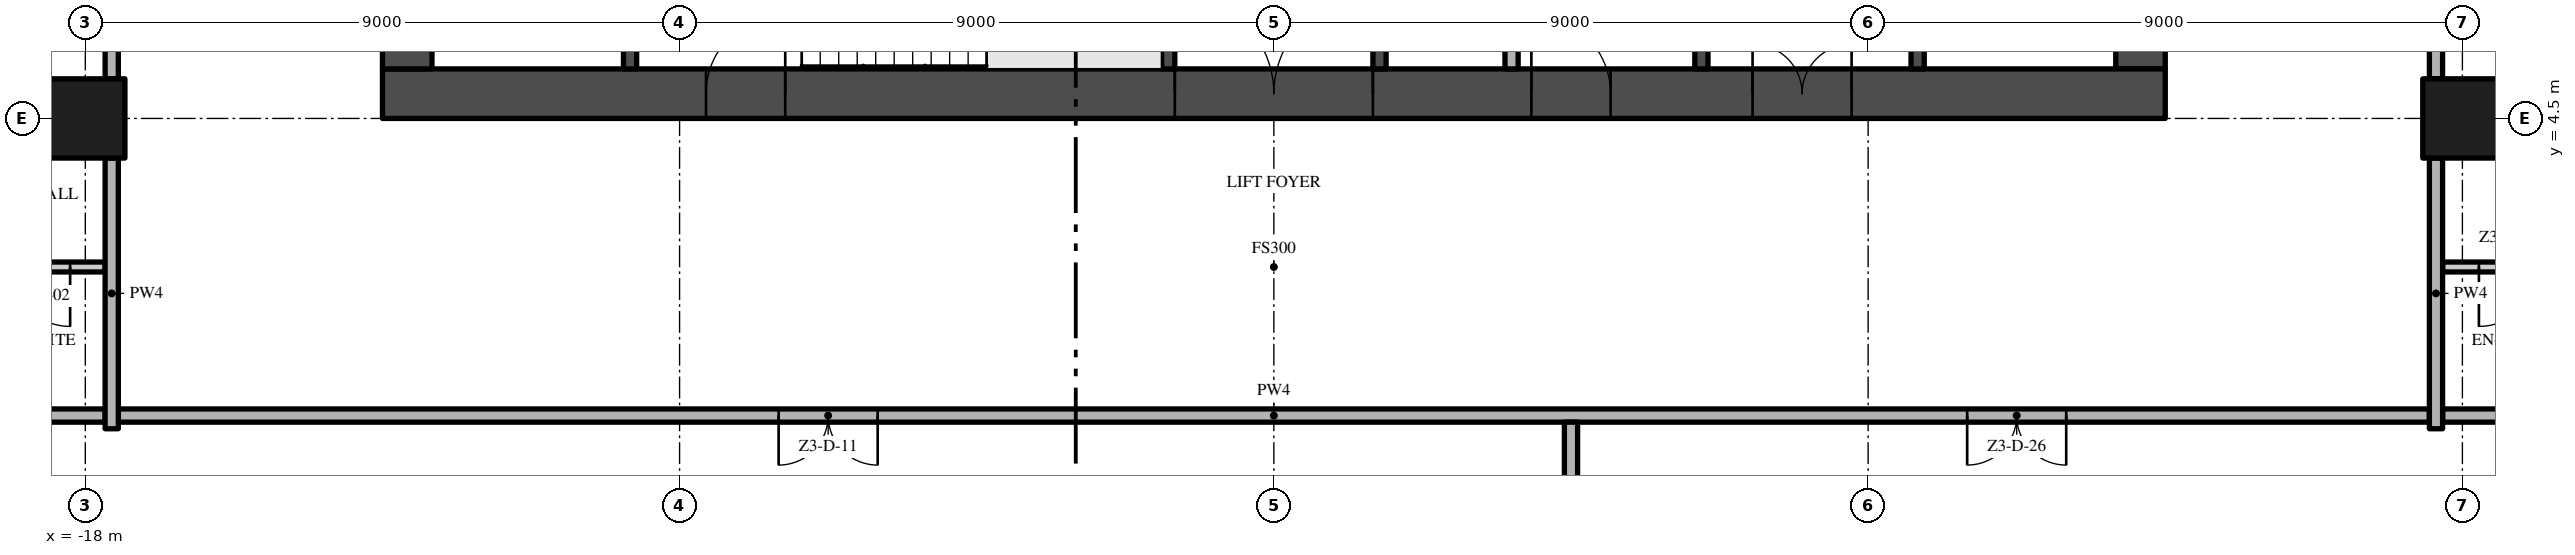
"""IFC4 building model, lengths in metres.
Left out: names, types, materials, properties, quantities, classifications, styles, units other than length and angle.
Written with IfcOpenShell. Run it as: python <this file> out.ifc"""

import sys

from ifc_helpers import new_model, si_unit, direction, frame, frame_2d, origin, origin_2d, place, context, subcontext, project, spatial, rectangle, extrude, element, fill, save


model = new_model("IFC4")
c1 = context("Model", 3, precision=1e-05, world=origin(), true_north=direction((0.0, 1.0)))
c2 = subcontext(c1, "Body", "Model", "MODEL_VIEW")
j1 = project(units=[si_unit("LENGTHUNIT", "METRE"), si_unit("PLANEANGLEUNIT", "RADIAN")], contexts=[c1])
p1 = place(None, origin())
s1 = spatial("IfcSite", under=j1, at=p1, CompositionType="ELEMENT")
p2 = place(p1, origin())
s2 = spatial("IfcBuilding", under=s1, at=p2, CompositionType="ELEMENT")
p3 = place(p2, frame((0.0, 0.0, 163.0)))
s3 = spatial("IfcBuildingStorey", under=s2, at=p3, CompositionType="ELEMENT", Elevation=163.0)
p4 = place(p3, frame((-13.5, 4.875, -0.3), z_axis=(0.0, 0.0, 1.0), x_axis=(1.0, 0.0, 0.0)))
e1 = element("IfcWall", 1, at=p4, inside=s3, PredefinedType="SHEAR", context=c2, shape_type="SweptSolid", body=[
    extrude(rectangle(XDim=27.0, YDim=0.75, at=frame_2d((13.5, 0.0))), origin(), (0.0, 0.0, 1.0), 3.8),
])
p5 = place(p4, frame((12.0, 0.0, 0.3)))
e2 = element("IfcOpeningElement", 2, at=p5, cuts=e1, PredefinedType="OPENING", context=c2, shape_type="SweptSolid", body=[
    extrude(rectangle(XDim=3.0, YDim=2.4, at=frame_2d((1.5, 1.2))), frame((0.0, 0.385, 0.0), z_axis=(0.0, -1.0, 0.0), x_axis=(1.0, 0.0, 0.0)), (0.0, 0.0, 1.0), 0.77),
])
p6 = place(p4, frame((4.9, 0.0, 0.3)))
e3 = element("IfcOpeningElement", 3, at=p6, cuts=e1, PredefinedType="OPENING", context=c2, shape_type="SweptSolid", body=[
    extrude(rectangle(XDim=1.2, YDim=2.2, at=frame_2d((0.6, 1.1))), frame((0.0, 0.385, 0.0), z_axis=(0.0, -1.0, 0.0), x_axis=(1.0, 0.0, 0.0)), (0.0, 0.0, 1.0), 0.77),
])
p7 = place(p4, frame((20.75, 0.0, 0.3)))
e4 = element("IfcOpeningElement", 4, at=p7, cuts=e1, PredefinedType="OPENING", context=c2, shape_type="SweptSolid", body=[
    extrude(rectangle(XDim=1.5, YDim=2.2, at=frame_2d((0.75, 1.1))), frame((0.0, 0.385, 0.0), z_axis=(0.0, -1.0, 0.0), x_axis=(1.0, 0.0, 0.0)), (0.0, 0.0, 1.0), 0.77),
])
p8 = place(p4, frame((17.4, 0.0, 0.3)))
e5 = element("IfcOpeningElement", 5, at=p8, cuts=e1, PredefinedType="OPENING", context=c2, shape_type="SweptSolid", body=[
    extrude(rectangle(XDim=1.2, YDim=2.2, at=frame_2d((0.6, 1.1))), frame((0.0, 0.385, 0.0), z_axis=(0.0, -1.0, 0.0), x_axis=(1.0, 0.0, 0.0)), (0.0, 0.0, 1.0), 0.77),
])
p9 = place(p3, frame((13.125, 5.25, -0.3), z_axis=(0.0, 0.0, 1.0), x_axis=(0.0, 1.0, 0.0)))
e6 = element("IfcWall", 6, at=p9, inside=s3, PredefinedType="SHEAR", context=c2, shape_type="SweptSolid", body=[
    extrude(rectangle(XDim=16.5, YDim=0.75, at=frame_2d((8.25, 0.0))), origin(), (0.0, 0.0, 1.0), 3.8),
])
p10 = place(p9, frame((6.15, 0.0, 0.3)))
e7 = element("IfcOpeningElement", 7, at=p10, cuts=e6, PredefinedType="OPENING", context=c2, shape_type="SweptSolid", body=[
    extrude(rectangle(XDim=1.2, YDim=2.2, at=frame_2d((0.6, 1.1))), frame((0.0, 0.385, 0.0), z_axis=(0.0, -1.0, 0.0), x_axis=(1.0, 0.0, 0.0)), (0.0, 0.0, 1.0), 0.77),
])
p11 = place(p3, frame((-13.125, 21.75, -0.3), z_axis=(0.0, 0.0, 1.0), x_axis=(0.0, -1.0, 0.0)))
e8 = element("IfcWall", 8, at=p11, inside=s3, PredefinedType="SHEAR", context=c2, shape_type="SweptSolid", body=[
    extrude(rectangle(XDim=16.5, YDim=0.75, at=frame_2d((8.25, 0.0))), origin(), (0.0, 0.0, 1.0), 3.8),
])
p12 = place(p11, frame((9.15, 0.0, 0.3)))
e9 = element("IfcOpeningElement", 9, at=p12, cuts=e8, PredefinedType="OPENING", context=c2, shape_type="SweptSolid", body=[
    extrude(rectangle(XDim=1.2, YDim=2.2, at=frame_2d((0.6, 1.1))), frame((0.0, 0.385, 0.0), z_axis=(0.0, -1.0, 0.0), x_axis=(1.0, 0.0, 0.0)), (0.0, 0.0, 1.0), 0.77),
])
for number, where, z_axis, x_axis in (
    (10, (-18.0, 4.5, 0.0), (0.0, 0.0, 1.0), (1.0, 0.0, 0.0)),
    (11, (18.0, 4.5, 0.0), (0.0, 0.0, 1.0), (1.0, 0.0, 0.0)),
):
    element("IfcColumn", number, at=place(p3, frame(where, z_axis=z_axis, x_axis=x_axis)), inside=s3, PredefinedType="COLUMN", context=c2, shape_type="SweptSolid", body=[
        extrude(rectangle(XDim=1.2, YDim=1.2, at=origin_2d()), origin(), (0.0, 0.0, 1.0), 3.5),
    ])
for number, where, z_axis, x_axis in (
    (12, (-9.75, 5.25, 0.0), (0.0, 0.0, 1.0), (0.0, 1.0, 0.0)),
    (13, (-1.6, 5.25, 0.0), (0.0, 0.0, 1.0), (0.0, 1.0, 0.0)),
):
    element("IfcWall", number, at=place(p3, frame(where, z_axis=z_axis, x_axis=x_axis)), inside=s3, PredefinedType="SHEAR", context=c2, shape_type="SweptSolid", body=[
        extrude(rectangle(XDim=2.7, YDim=0.2, at=frame_2d((1.35, 0.0))), origin(), (0.0, 0.0, 1.0), 3.5),
    ])
p13 = place(p3, frame((1.6, 13.5, 0.0), z_axis=(0.0, 0.0, 1.0), x_axis=(0.0, -1.0, 0.0)))
e14 = element("IfcWall", 14, at=p13, inside=s3, PredefinedType="SHEAR", context=c2, shape_type="SweptSolid", body=[
    extrude(rectangle(XDim=8.25, YDim=0.2, at=frame_2d((4.125, 0.0))), origin(), (0.0, 0.0, 1.0), 3.5),
])
p14 = place(p13, frame((3.275, 0.0, 0.0)))
e15 = element("IfcOpeningElement", 15, at=p14, cuts=e14, PredefinedType="OPENING", context=c2, shape_type="SweptSolid", body=[
    extrude(rectangle(XDim=0.9, YDim=2.1, at=frame_2d((0.45, 1.05))), frame((0.0, 0.11, 0.0), z_axis=(0.0, -1.0, 0.0), x_axis=(1.0, 0.0, 0.0)), (0.0, 0.0, 1.0), 0.22),
])
p15 = place(p3, frame((3.6, 13.5, 0.0), z_axis=(0.0, 0.0, 1.0), x_axis=(0.0, -1.0, 0.0)))
e16 = element("IfcWall", 16, at=p15, inside=s3, PredefinedType="PARTITIONING", context=c2, shape_type="SweptSolid", body=[
    extrude(rectangle(XDim=8.25, YDim=0.2, at=frame_2d((4.125, 0.0))), origin(), (0.0, 0.0, 1.0), 3.5),
])
p16 = place(p15, frame((3.675, 0.0, 0.0)))
e17 = element("IfcOpeningElement", 17, at=p16, cuts=e16, PredefinedType="OPENING", context=c2, shape_type="SweptSolid", body=[
    extrude(rectangle(XDim=0.9, YDim=2.1, at=frame_2d((0.45, 1.05))), frame((0.0, 0.11, 0.0), z_axis=(0.0, -1.0, 0.0), x_axis=(1.0, 0.0, 0.0)), (0.0, 0.0, 1.0), 0.22),
])
p17 = place(p3, frame((6.475, 5.25, 0.0), z_axis=(0.0, 0.0, 1.0), x_axis=(0.0, 1.0, 0.0)))
e18 = element("IfcWall", 18, at=p17, inside=s3, PredefinedType="SHEAR", context=c2, shape_type="SweptSolid", body=[
    extrude(rectangle(XDim=6.85, YDim=0.2, at=frame_2d((3.425, 0.0))), origin(), (0.0, 0.0, 1.0), 3.5),
])
p18 = place(p3, frame((9.75, 5.25, 0.0), z_axis=(0.0, 0.0, 1.0), x_axis=(0.0, 1.0, 0.0)))
e19 = element("IfcWall", 19, at=p18, inside=s3, PredefinedType="SHEAR", context=c2, shape_type="SweptSolid", body=[
    extrude(rectangle(XDim=2.35, YDim=0.2, at=frame_2d((1.175, 0.0))), origin(), (0.0, 0.0, 1.0), 3.5),
])
p19 = place(p18, frame((0.7, 0.0, 0.0)))
e20 = element("IfcOpeningElement", 20, at=p19, cuts=e19, PredefinedType="OPENING", context=c2, shape_type="SweptSolid", body=[
    extrude(rectangle(XDim=1.1, YDim=2.1, at=frame_2d((0.55, 1.05))), frame((0.0, 0.11, 0.0), z_axis=(0.0, -1.0, 0.0), x_axis=(1.0, 0.0, 0.0)), (0.0, 0.0, 1.0), 0.22),
])
p20 = place(p3, frame((17.5, 0.0, 0.0), z_axis=(0.0, 0.0, 1.0), x_axis=(-1.0, 0.0, 0.0)))
e21 = element("IfcWall", 21, at=p20, inside=s3, PredefinedType="PARTITIONING", context=c2, shape_type="SweptSolid", body=[
    extrude(rectangle(XDim=35.0, YDim=0.2, at=frame_2d((17.5, 0.0))), origin(), (0.0, 0.0, 1.0), 3.5),
])
p21 = place(p20, frame((23.5, 0.0, 0.0)))
e22 = element("IfcOpeningElement", 22, at=p21, cuts=e21, PredefinedType="OPENING", context=c2, shape_type="SweptSolid", body=[
    extrude(rectangle(XDim=1.5, YDim=2.4, at=frame_2d((0.75, 1.2))), frame((0.0, 0.11, 0.0), z_axis=(0.0, -1.0, 0.0), x_axis=(1.0, 0.0, 0.0)), (0.0, 0.0, 1.0), 0.22),
])
p22 = place(p20, frame((5.5, 0.0, 0.0)))
e23 = element("IfcOpeningElement", 23, at=p22, cuts=e21, PredefinedType="OPENING", context=c2, shape_type="SweptSolid", body=[
    extrude(rectangle(XDim=1.5, YDim=2.4, at=frame_2d((0.75, 1.2))), frame((0.0, 0.11, 0.0), z_axis=(0.0, -1.0, 0.0), x_axis=(1.0, 0.0, 0.0)), (0.0, 0.0, 1.0), 0.22),
])
for number, where, z_axis, x_axis in (
    (24, (-22.2, 0.0, 0.0), (0.0, 0.0, 1.0), (1.0, 0.0, 0.0)),
    (25, (17.7, 0.0, 0.0), (0.0, 0.0, 1.0), (1.0, 0.0, 0.0)),
):
    element("IfcWall", number, at=place(p3, frame(where, z_axis=z_axis, x_axis=x_axis)), inside=s3, PredefinedType="PARTITIONING", context=c2, shape_type="SweptSolid", body=[
        extrude(rectangle(XDim=4.5, YDim=0.2, at=frame_2d((2.25, 0.0))), origin(), (0.0, 0.0, 1.0), 3.5),
    ])
p23 = place(p3, frame((-17.7, 2.25, 0.0), z_axis=(0.0, 0.0, 1.0), x_axis=(-1.0, 0.0, 0.0)))
e26 = element("IfcWall", 26, at=p23, inside=s3, PredefinedType="PARTITIONING", context=c2, shape_type="SweptSolid", body=[
    extrude(rectangle(XDim=2.03, YDim=0.15, at=frame_2d((1.015, 0.0))), origin(), (0.0, 0.0, 1.0), 3.5),
])
p24 = place(p23, frame((0.53, 0.0, 0.0)))
e27 = element("IfcOpeningElement", 27, at=p24, cuts=e26, PredefinedType="OPENING", context=c2, shape_type="SweptSolid", body=[
    extrude(rectangle(XDim=0.9, YDim=2.1, at=frame_2d((0.45, 1.05))), frame((0.0, 0.085, 0.0), z_axis=(0.0, -1.0, 0.0), x_axis=(1.0, 0.0, 0.0)), (0.0, 0.0, 1.0), 0.17),
])
p25 = place(p3, frame((19.73, 2.25, 0.0), z_axis=(0.0, 0.0, 1.0), x_axis=(-1.0, 0.0, 0.0)))
e28 = element("IfcWall", 28, at=p25, inside=s3, PredefinedType="PARTITIONING", context=c2, shape_type="SweptSolid", body=[
    extrude(rectangle(XDim=2.03, YDim=0.15, at=frame_2d((1.015, 0.0))), origin(), (0.0, 0.0, 1.0), 3.5),
])
p26 = place(p25, frame((0.58, 0.0, 0.0)))
e29 = element("IfcOpeningElement", 29, at=p26, cuts=e28, PredefinedType="OPENING", context=c2, shape_type="SweptSolid", body=[
    extrude(rectangle(XDim=0.9, YDim=2.1, at=frame_2d((0.45, 1.05))), frame((0.0, 0.085, 0.0), z_axis=(0.0, -1.0, 0.0), x_axis=(1.0, 0.0, 0.0)), (0.0, 0.0, 1.0), 0.17),
])
p27 = place(p3, frame((-17.6, -0.2, 0.0), z_axis=(0.0, 0.0, 1.0), x_axis=(0.0, 1.0, 0.0)))
e30 = element("IfcWall", 30, at=p27, inside=s3, PredefinedType="PARTITIONING", context=c2, shape_type="SweptSolid", body=[
    extrude(rectangle(XDim=4.1, YDim=0.2, at=frame_2d((2.05, 0.0))), origin(), (0.0, 0.0, 1.0), 3.5),
])
p28 = place(p3, frame((-17.6, 5.1, 0.0), z_axis=(0.0, 0.0, 1.0), x_axis=(0.0, 1.0, 0.0)))
e31 = element("IfcWall", 31, at=p28, inside=s3, PredefinedType="PARTITIONING", context=c2, shape_type="SweptSolid", body=[
    extrude(rectangle(XDim=7.8, YDim=0.2, at=frame_2d((3.9, 0.0))), origin(), (0.0, 0.0, 1.0), 3.5),
])
p29 = place(p28, frame((1.05, 0.0, 0.0)))
e32 = element("IfcOpeningElement", 32, at=p29, cuts=e31, PredefinedType="OPENING", context=c2, shape_type="SweptSolid", body=[
    extrude(rectangle(XDim=1.2, YDim=2.4, at=frame_2d((0.6, 1.2))), frame((0.0, 0.11, 0.0), z_axis=(0.0, -1.0, 0.0), x_axis=(1.0, 0.0, 0.0)), (0.0, 0.0, 1.0), 0.22),
])
p30 = place(p3, frame((4.5, -17.7, 0.0), z_axis=(0.0, 0.0, 1.0), x_axis=(0.0, 1.0, 0.0)))
e33 = element("IfcWall", 33, at=p30, inside=s3, PredefinedType="PARTITIONING", context=c2, shape_type="SweptSolid", body=[
    extrude(rectangle(XDim=17.6, YDim=0.2, at=frame_2d((8.8, 0.0))), origin(), (0.0, 0.0, 1.0), 3.5),
])
p31 = place(p3, frame((17.6, -0.2, 0.0), z_axis=(0.0, 0.0, 1.0), x_axis=(0.0, 1.0, 0.0)))
e34 = element("IfcWall", 34, at=p31, inside=s3, PredefinedType="PARTITIONING", context=c2, shape_type="SweptSolid", body=[
    extrude(rectangle(XDim=4.1, YDim=0.2, at=frame_2d((2.05, 0.0))), origin(), (0.0, 0.0, 1.0), 3.5),
])
p32 = place(p3, frame((17.6, 12.9, 0.0), z_axis=(0.0, 0.0, 1.0), x_axis=(0.0, -1.0, 0.0)))
e35 = element("IfcWall", 35, at=p32, inside=s3, PredefinedType="PARTITIONING", context=c2, shape_type="SweptSolid", body=[
    extrude(rectangle(XDim=7.8, YDim=0.2, at=frame_2d((3.9, 0.0))), origin(), (0.0, 0.0, 1.0), 3.5),
])
p33 = place(p32, frame((5.55, 0.0, 0.0)))
e36 = element("IfcOpeningElement", 36, at=p33, cuts=e35, PredefinedType="OPENING", context=c2, shape_type="SweptSolid", body=[
    extrude(rectangle(XDim=1.2, YDim=2.4, at=frame_2d((0.6, 1.2))), frame((0.0, 0.11, 0.0), z_axis=(0.0, -1.0, 0.0), x_axis=(1.0, 0.0, 0.0)), (0.0, 0.0, 1.0), 0.22),
])
p34 = place(p5, frame((3.0, 0.0, 0.0), z_axis=(0.0, 0.0, 1.0), x_axis=(-1.0, 0.0, 0.0)))
e37 = element("IfcDoor", 37, at=p34, inside=s3, OperationType="DOUBLE_DOOR_SINGLE_SWING", PredefinedType="DOOR", context=c2, shape_type="SweptSolid", body=[
    extrude(rectangle(XDim=3.0, YDim=2.4, at=frame_2d((1.5, 1.2))), frame((0.0, 0.025, 0.0), z_axis=(0.0, -1.0, 0.0), x_axis=(1.0, 0.0, 0.0)), (0.0, 0.0, 1.0), 0.05),
])
fill(e2, e37)
p35 = place(p6, frame((1.2, 0.0, 0.0), z_axis=(0.0, 0.0, 1.0), x_axis=(-1.0, 0.0, 0.0)))
e38 = element("IfcDoor", 38, at=p35, inside=s3, OperationType="SINGLE_SWING_LEFT", PredefinedType="DOOR", context=c2, shape_type="SweptSolid", body=[
    extrude(rectangle(XDim=1.2, YDim=2.2, at=frame_2d((0.6, 1.1))), frame((0.0, 0.025, 0.0), z_axis=(0.0, -1.0, 0.0), x_axis=(1.0, 0.0, 0.0)), (0.0, 0.0, 1.0), 0.05),
])
fill(e3, e38)
p36 = place(p7, frame((1.5, 0.0, 0.0), z_axis=(0.0, 0.0, 1.0), x_axis=(-1.0, 0.0, 0.0)))
e39 = element("IfcDoor", 39, at=p36, inside=s3, OperationType="DOUBLE_DOOR_SINGLE_SWING", PredefinedType="DOOR", context=c2, shape_type="SweptSolid", body=[
    extrude(rectangle(XDim=1.5, YDim=2.2, at=frame_2d((0.75, 1.1))), frame((0.0, 0.025, 0.0), z_axis=(0.0, -1.0, 0.0), x_axis=(1.0, 0.0, 0.0)), (0.0, 0.0, 1.0), 0.05),
])
fill(e4, e39)
p37 = place(p8, frame((1.2, 0.0, 0.0), z_axis=(0.0, 0.0, 1.0), x_axis=(-1.0, 0.0, 0.0)))
e40 = element("IfcDoor", 40, at=p37, inside=s3, OperationType="SINGLE_SWING_RIGHT", PredefinedType="DOOR", context=c2, shape_type="SweptSolid", body=[
    extrude(rectangle(XDim=1.2, YDim=2.2, at=frame_2d((0.6, 1.1))), frame((0.0, 0.025, 0.0), z_axis=(0.0, -1.0, 0.0), x_axis=(1.0, 0.0, 0.0)), (0.0, 0.0, 1.0), 0.05),
])
fill(e5, e40)
p38 = place(p24, origin())
e41 = element("IfcDoor", 41, at=p38, inside=s3, OperationType="SINGLE_SWING_LEFT", PredefinedType="DOOR", context=c2, shape_type="SweptSolid", body=[
    extrude(rectangle(XDim=0.9, YDim=2.1, at=frame_2d((0.45, 1.05))), frame((0.0, 0.025, 0.0), z_axis=(0.0, -1.0, 0.0), x_axis=(1.0, 0.0, 0.0)), (0.0, 0.0, 1.0), 0.05),
])
fill(e27, e41)
p39 = place(p26, origin())
e42 = element("IfcDoor", 42, at=p39, inside=s3, OperationType="SINGLE_SWING_RIGHT", PredefinedType="DOOR", context=c2, shape_type="SweptSolid", body=[
    extrude(rectangle(XDim=0.9, YDim=2.1, at=frame_2d((0.45, 1.05))), frame((0.0, 0.025, 0.0), z_axis=(0.0, -1.0, 0.0), x_axis=(1.0, 0.0, 0.0)), (0.0, 0.0, 1.0), 0.05),
])
fill(e29, e42)
p40 = place(p21, origin())
e43 = element("IfcDoor", 43, at=p40, inside=s3, OperationType="DOUBLE_DOOR_SINGLE_SWING", PredefinedType="DOOR", context=c2, shape_type="SweptSolid", body=[
    extrude(rectangle(XDim=1.5, YDim=2.4, at=frame_2d((0.75, 1.2))), frame((0.0, 0.025, 0.0), z_axis=(0.0, -1.0, 0.0), x_axis=(1.0, 0.0, 0.0)), (0.0, 0.0, 1.0), 0.05),
])
fill(e22, e43)
p41 = place(p22, origin())
e44 = element("IfcDoor", 44, at=p41, inside=s3, OperationType="DOUBLE_DOOR_SINGLE_SWING", PredefinedType="DOOR", context=c2, shape_type="SweptSolid", body=[
    extrude(rectangle(XDim=1.5, YDim=2.4, at=frame_2d((0.75, 1.2))), frame((0.0, 0.025, 0.0), z_axis=(0.0, -1.0, 0.0), x_axis=(1.0, 0.0, 0.0)), (0.0, 0.0, 1.0), 0.05),
])
fill(e23, e44)
save(model, sys.argv[1])
